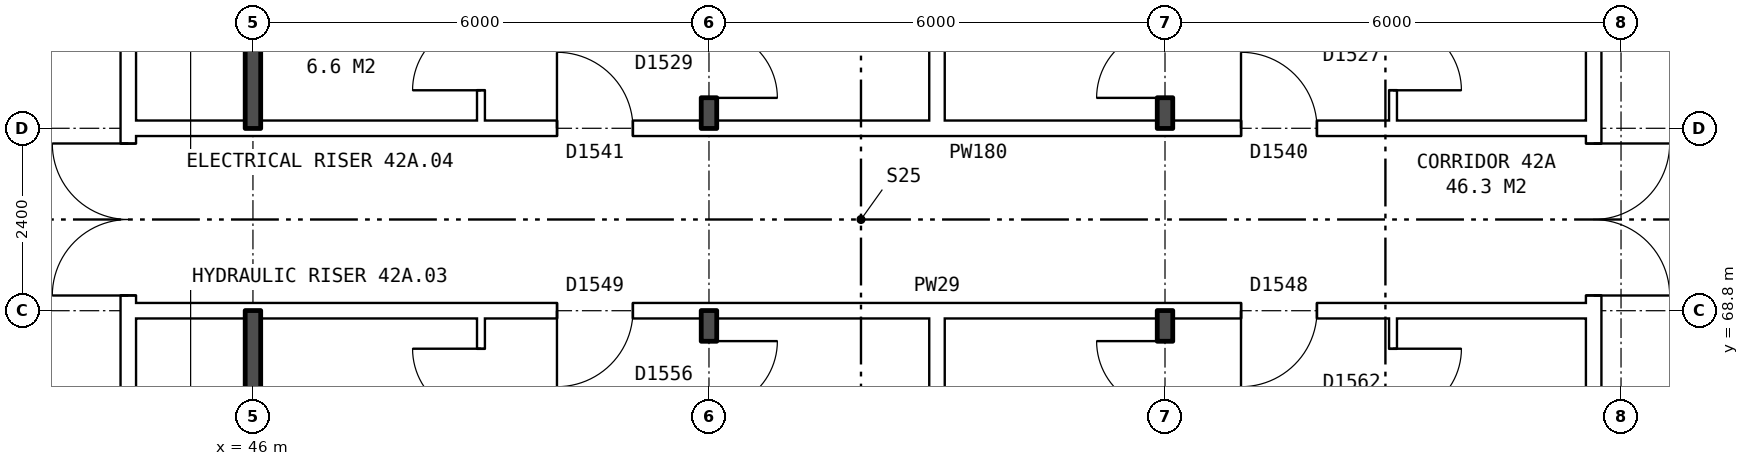
"""IFC4 building model, lengths in metres.
Left out: names, types, materials, properties, quantities, classifications, styles, units other than length and angle.
Written with IfcOpenShell. Run it as: python <this file> out.ifc"""

import sys

from ifc_helpers import new_model, si_unit, direction, frame, frame_2d, origin, place, context, subcontext, project, spatial, rectangle, extrude, element, fill, save


model = new_model("IFC4")
c1 = context("Model", 3, precision=1e-05, world=origin(), true_north=direction((0.0, 1.0)))
c2 = subcontext(c1, "Body", "Model", "MODEL_VIEW")
j1 = project(units=[si_unit("LENGTHUNIT", "METRE"), si_unit("PLANEANGLEUNIT", "RADIAN")], contexts=[c1])
p1 = place(None, origin())
s1 = spatial("IfcSite", under=j1, at=p1, CompositionType="ELEMENT")
p2 = place(p1, origin())
s2 = spatial("IfcBuilding", under=s1, at=p2, CompositionType="ELEMENT")
p3 = place(p2, frame((0.0, 0.0, 151.6)))
s3 = spatial("IfcBuildingStorey", under=s2, at=p3, CompositionType="ELEMENT", Elevation=151.6)
p4 = place(p3, frame((63.64, 63.9, 0.0), z_axis=(0.0, 0.0, 1.0), x_axis=(0.0, 1.0, 0.0)))
e1 = element("IfcWall", 1, at=p4, inside=s3, PredefinedType="PARTITIONING", context=c2, shape_type="SweptSolid", body=[
    extrude(rectangle(XDim=12.2, YDim=0.2, at=frame_2d((6.1, 0.0))), origin(), (0.0, 0.0, 1.0), 2.85),
])
p5 = place(p4, frame((5.1, 0.0, 0.0)))
e2 = element("IfcOpeningElement", 2, at=p5, cuts=e1, PredefinedType="OPENING", context=c2, shape_type="SweptSolid", body=[
    extrude(rectangle(XDim=2.0, YDim=2.1, at=frame_2d((1.0, 1.05))), frame((0.0, 0.11, 0.0), z_axis=(0.0, -1.0, 0.0), x_axis=(1.0, 0.0, 0.0)), (0.0, 0.0, 1.0), 0.22),
])
p6 = place(p3, frame((44.36, 63.9, 0.0), z_axis=(0.0, 0.0, 1.0), x_axis=(0.0, 1.0, 0.0)))
e3 = element("IfcWall", 3, at=p6, inside=s3, PredefinedType="PARTITIONING", context=c2, shape_type="SweptSolid", body=[
    extrude(rectangle(XDim=12.2, YDim=0.2, at=frame_2d((6.1, 0.0))), origin(), (0.0, 0.0, 1.0), 2.85),
])
p7 = place(p6, frame((5.1, 0.0, 0.0)))
e4 = element("IfcOpeningElement", 4, at=p7, cuts=e3, PredefinedType="OPENING", context=c2, shape_type="SweptSolid", body=[
    extrude(rectangle(XDim=2.0, YDim=2.1, at=frame_2d((1.0, 1.05))), frame((0.0, 0.11, 0.0), z_axis=(0.0, -1.0, 0.0), x_axis=(1.0, 0.0, 0.0)), (0.0, 0.0, 1.0), 0.22),
])
p8 = place(p3, frame((44.36, 68.8, 0.0), z_axis=(0.0, 0.0, 1.0), x_axis=(1.0, 0.0, 0.0)))
e5 = element("IfcWall", 5, at=p8, inside=s3, PredefinedType="PARTITIONING", context=c2, shape_type="SweptSolid", body=[
    extrude(rectangle(XDim=19.28, YDim=0.2, at=frame_2d((9.64, 0.0))), origin(), (0.0, 0.0, 1.0), 2.85),
])
p9 = place(p8, frame((14.64, 0.0, 0.0)))
e6 = element("IfcOpeningElement", 6, at=p9, cuts=e5, PredefinedType="OPENING", context=c2, shape_type="SweptSolid", body=[
    extrude(rectangle(XDim=1.0, YDim=2.1, at=frame_2d((0.5, 1.05))), frame((0.0, 0.11, 0.0), z_axis=(0.0, -1.0, 0.0), x_axis=(1.0, 0.0, 0.0)), (0.0, 0.0, 1.0), 0.22),
])
p10 = place(p8, frame((5.64, 0.0, 0.0)))
e7 = element("IfcOpeningElement", 7, at=p10, cuts=e5, PredefinedType="OPENING", context=c2, shape_type="SweptSolid", body=[
    extrude(rectangle(XDim=1.0, YDim=2.1, at=frame_2d((0.5, 1.05))), frame((0.0, 0.11, 0.0), z_axis=(0.0, -1.0, 0.0), x_axis=(1.0, 0.0, 0.0)), (0.0, 0.0, 1.0), 0.22),
])
p11 = place(p3, frame((44.36, 71.2, 0.0), z_axis=(0.0, 0.0, 1.0), x_axis=(1.0, 0.0, 0.0)))
e8 = element("IfcWall", 8, at=p11, inside=s3, PredefinedType="PARTITIONING", context=c2, shape_type="SweptSolid", body=[
    extrude(rectangle(XDim=19.28, YDim=0.2, at=frame_2d((9.64, 0.0))), origin(), (0.0, 0.0, 1.0), 2.85),
])
p12 = place(p11, frame((14.64, 0.0, 0.0)))
e9 = element("IfcOpeningElement", 9, at=p12, cuts=e8, PredefinedType="OPENING", context=c2, shape_type="SweptSolid", body=[
    extrude(rectangle(XDim=1.0, YDim=2.1, at=frame_2d((0.5, 1.05))), frame((0.0, 0.11, 0.0), z_axis=(0.0, -1.0, 0.0), x_axis=(1.0, 0.0, 0.0)), (0.0, 0.0, 1.0), 0.22),
])
p13 = place(p11, frame((5.64, 0.0, 0.0)))
e10 = element("IfcOpeningElement", 10, at=p13, cuts=e8, PredefinedType="OPENING", context=c2, shape_type="SweptSolid", body=[
    extrude(rectangle(XDim=1.0, YDim=2.1, at=frame_2d((0.5, 1.05))), frame((0.0, 0.11, 0.0), z_axis=(0.0, -1.0, 0.0), x_axis=(1.0, 0.0, 0.0)), (0.0, 0.0, 1.0), 0.22),
])
for number, where, z_axis, x_axis in (
    (11, (46.0, 63.8, 0.0), (0.0, 0.0, 1.0), (0.0, 1.0, 0.0)),
    (12, (46.0, 71.2, 0.0), (0.0, 0.0, 1.0), (0.0, 1.0, 0.0)),
):
    element("IfcWall", number, at=place(p3, frame(where, z_axis=z_axis, x_axis=x_axis)), inside=s3, PredefinedType="SOLIDWALL", context=c2, shape_type="SweptSolid", body=[
        extrude(rectangle(XDim=5.0, YDim=0.2, at=frame_2d((2.5, 0.0))), origin(), (0.0, 0.0, 1.0), 2.85),
    ])
p14 = place(p3, frame((49.0, 54.36, 0.0), z_axis=(0.0, 0.0, 1.0), x_axis=(0.0, 1.0, 0.0)))
e13 = element("IfcWall", 13, at=p14, inside=s3, PredefinedType="PARTITIONING", context=c2, shape_type="SweptSolid", body=[
    extrude(rectangle(XDim=14.34, YDim=0.1, at=frame_2d((7.17, 0.0))), origin(), (0.0, 0.0, 1.0), 2.85),
])
p15 = place(p14, frame((7.7, 0.0, 0.0)))
e14 = element("IfcOpeningElement", 14, at=p15, cuts=e13, PredefinedType="OPENING", context=c2, shape_type="SweptSolid", body=[
    extrude(rectangle(XDim=0.9, YDim=2.1, at=frame_2d((0.45, 1.05))), frame((0.0, 0.06, 0.0), z_axis=(0.0, -1.0, 0.0), x_axis=(1.0, 0.0, 0.0)), (0.0, 0.0, 1.0), 0.12),
])
p16 = place(p14, frame((13.04, 0.0, 0.0)))
e15 = element("IfcOpeningElement", 15, at=p16, cuts=e13, PredefinedType="OPENING", context=c2, shape_type="SweptSolid", body=[
    extrude(rectangle(XDim=0.9, YDim=2.1, at=frame_2d((0.45, 1.05))), frame((0.0, 0.06, 0.0), z_axis=(0.0, -1.0, 0.0), x_axis=(1.0, 0.0, 0.0)), (0.0, 0.0, 1.0), 0.12),
])
p17 = place(p3, frame((49.0, 71.3, 0.0), z_axis=(0.0, 0.0, 1.0), x_axis=(0.0, 1.0, 0.0)))
e16 = element("IfcWall", 16, at=p17, inside=s3, PredefinedType="PARTITIONING", context=c2, shape_type="SweptSolid", body=[
    extrude(rectangle(XDim=14.34, YDim=0.1, at=frame_2d((7.17, 0.0))), origin(), (0.0, 0.0, 1.0), 2.85),
])
p18 = place(p17, frame((5.74, 0.0, 0.0)))
e17 = element("IfcOpeningElement", 17, at=p18, cuts=e16, PredefinedType="OPENING", context=c2, shape_type="SweptSolid", body=[
    extrude(rectangle(XDim=0.9, YDim=2.1, at=frame_2d((0.45, 1.05))), frame((0.0, 0.06, 0.0), z_axis=(0.0, -1.0, 0.0), x_axis=(1.0, 0.0, 0.0)), (0.0, 0.0, 1.0), 0.12),
])
p19 = place(p17, frame((0.4, 0.0, 0.0)))
e18 = element("IfcOpeningElement", 18, at=p19, cuts=e16, PredefinedType="OPENING", context=c2, shape_type="SweptSolid", body=[
    extrude(rectangle(XDim=0.9, YDim=2.1, at=frame_2d((0.45, 1.05))), frame((0.0, 0.06, 0.0), z_axis=(0.0, -1.0, 0.0), x_axis=(1.0, 0.0, 0.0)), (0.0, 0.0, 1.0), 0.12),
])
p20 = place(p3, frame((52.0, 54.36, 0.0), z_axis=(0.0, 0.0, 1.0), x_axis=(0.0, 1.0, 0.0)))
e19 = element("IfcWall", 19, at=p20, inside=s3, PredefinedType="SOLIDWALL", context=c2, shape_type="SweptSolid", body=[
    extrude(rectangle(XDim=14.44, YDim=0.2, at=frame_2d((7.22, 0.0))), origin(), (0.0, 0.0, 1.0), 2.85),
])
p21 = place(p20, frame((7.7, 0.0, 0.0)))
e20 = element("IfcOpeningElement", 20, at=p21, cuts=e19, PredefinedType="OPENING", context=c2, shape_type="SweptSolid", body=[
    extrude(rectangle(XDim=0.9, YDim=2.1, at=frame_2d((0.45, 1.05))), frame((0.0, 0.11, 0.0), z_axis=(0.0, -1.0, 0.0), x_axis=(1.0, 0.0, 0.0)), (0.0, 0.0, 1.0), 0.22),
])
p22 = place(p20, frame((13.14, 0.0, 0.0)))
e21 = element("IfcOpeningElement", 21, at=p22, cuts=e19, PredefinedType="OPENING", context=c2, shape_type="SweptSolid", body=[
    extrude(rectangle(XDim=0.9, YDim=2.1, at=frame_2d((0.45, 1.05))), frame((0.0, 0.11, 0.0), z_axis=(0.0, -1.0, 0.0), x_axis=(1.0, 0.0, 0.0)), (0.0, 0.0, 1.0), 0.22),
])
p23 = place(p3, frame((52.0, 71.2, 0.0), z_axis=(0.0, 0.0, 1.0), x_axis=(0.0, 1.0, 0.0)))
e22 = element("IfcWall", 22, at=p23, inside=s3, PredefinedType="SOLIDWALL", context=c2, shape_type="SweptSolid", body=[
    extrude(rectangle(XDim=14.44, YDim=0.2, at=frame_2d((7.22, 0.0))), origin(), (0.0, 0.0, 1.0), 2.85),
])
p24 = place(p23, frame((5.84, 0.0, 0.0)))
e23 = element("IfcOpeningElement", 23, at=p24, cuts=e22, PredefinedType="OPENING", context=c2, shape_type="SweptSolid", body=[
    extrude(rectangle(XDim=0.9, YDim=2.1, at=frame_2d((0.45, 1.05))), frame((0.0, 0.11, 0.0), z_axis=(0.0, -1.0, 0.0), x_axis=(1.0, 0.0, 0.0)), (0.0, 0.0, 1.0), 0.22),
])
p25 = place(p23, frame((0.4, 0.0, 0.0)))
e24 = element("IfcOpeningElement", 24, at=p25, cuts=e22, PredefinedType="OPENING", context=c2, shape_type="SweptSolid", body=[
    extrude(rectangle(XDim=0.9, YDim=2.1, at=frame_2d((0.45, 1.05))), frame((0.0, 0.11, 0.0), z_axis=(0.0, -1.0, 0.0), x_axis=(1.0, 0.0, 0.0)), (0.0, 0.0, 1.0), 0.22),
])
for number, where, z_axis, x_axis in (
    (25, (55.0, 54.36, 0.0), (0.0, 0.0, 1.0), (0.0, 1.0, 0.0)),
    (26, (55.0, 71.3, 0.0), (0.0, 0.0, 1.0), (0.0, 1.0, 0.0)),
):
    element("IfcWall", number, at=place(p3, frame(where, z_axis=z_axis, x_axis=x_axis)), inside=s3, PredefinedType="PARTITIONING", context=c2, shape_type="SweptSolid", body=[
        extrude(rectangle(XDim=14.34, YDim=0.2, at=frame_2d((7.17, 0.0))), origin(), (0.0, 0.0, 1.0), 2.85),
    ])
p26 = place(p3, frame((58.0, 54.36, 0.0), z_axis=(0.0, 0.0, 1.0), x_axis=(0.0, 1.0, 0.0)))
e27 = element("IfcWall", 27, at=p26, inside=s3, PredefinedType="SOLIDWALL", context=c2, shape_type="SweptSolid", body=[
    extrude(rectangle(XDim=14.44, YDim=0.2, at=frame_2d((7.22, 0.0))), origin(), (0.0, 0.0, 1.0), 2.85),
])
p27 = place(p26, frame((7.7, 0.0, 0.0)))
e28 = element("IfcOpeningElement", 28, at=p27, cuts=e27, PredefinedType="OPENING", context=c2, shape_type="SweptSolid", body=[
    extrude(rectangle(XDim=0.9, YDim=2.1, at=frame_2d((0.45, 1.05))), frame((0.0, 0.11, 0.0), z_axis=(0.0, -1.0, 0.0), x_axis=(1.0, 0.0, 0.0)), (0.0, 0.0, 1.0), 0.22),
])
p28 = place(p26, frame((13.14, 0.0, 0.0)))
e29 = element("IfcOpeningElement", 29, at=p28, cuts=e27, PredefinedType="OPENING", context=c2, shape_type="SweptSolid", body=[
    extrude(rectangle(XDim=0.9, YDim=2.1, at=frame_2d((0.45, 1.05))), frame((0.0, 0.11, 0.0), z_axis=(0.0, -1.0, 0.0), x_axis=(1.0, 0.0, 0.0)), (0.0, 0.0, 1.0), 0.22),
])
p29 = place(p3, frame((58.0, 71.2, 0.0), z_axis=(0.0, 0.0, 1.0), x_axis=(0.0, 1.0, 0.0)))
e30 = element("IfcWall", 30, at=p29, inside=s3, PredefinedType="SOLIDWALL", context=c2, shape_type="SweptSolid", body=[
    extrude(rectangle(XDim=14.44, YDim=0.2, at=frame_2d((7.22, 0.0))), origin(), (0.0, 0.0, 1.0), 2.85),
])
p30 = place(p29, frame((5.84, 0.0, 0.0)))
e31 = element("IfcOpeningElement", 31, at=p30, cuts=e30, PredefinedType="OPENING", context=c2, shape_type="SweptSolid", body=[
    extrude(rectangle(XDim=0.9, YDim=2.1, at=frame_2d((0.45, 1.05))), frame((0.0, 0.11, 0.0), z_axis=(0.0, -1.0, 0.0), x_axis=(1.0, 0.0, 0.0)), (0.0, 0.0, 1.0), 0.22),
])
p31 = place(p29, frame((0.4, 0.0, 0.0)))
e32 = element("IfcOpeningElement", 32, at=p31, cuts=e30, PredefinedType="OPENING", context=c2, shape_type="SweptSolid", body=[
    extrude(rectangle(XDim=0.9, YDim=2.1, at=frame_2d((0.45, 1.05))), frame((0.0, 0.11, 0.0), z_axis=(0.0, -1.0, 0.0), x_axis=(1.0, 0.0, 0.0)), (0.0, 0.0, 1.0), 0.22),
])
p32 = place(p3, frame((61.0, 54.36, 0.0), z_axis=(0.0, 0.0, 1.0), x_axis=(0.0, 1.0, 0.0)))
e33 = element("IfcWall", 33, at=p32, inside=s3, PredefinedType="PARTITIONING", context=c2, shape_type="SweptSolid", body=[
    extrude(rectangle(XDim=14.34, YDim=0.1, at=frame_2d((7.17, 0.0))), origin(), (0.0, 0.0, 1.0), 2.85),
])
p33 = place(p32, frame((7.7, 0.0, 0.0)))
e34 = element("IfcOpeningElement", 34, at=p33, cuts=e33, PredefinedType="OPENING", context=c2, shape_type="SweptSolid", body=[
    extrude(rectangle(XDim=0.9, YDim=2.1, at=frame_2d((0.45, 1.05))), frame((0.0, 0.06, 0.0), z_axis=(0.0, -1.0, 0.0), x_axis=(1.0, 0.0, 0.0)), (0.0, 0.0, 1.0), 0.12),
])
p34 = place(p32, frame((13.04, 0.0, 0.0)))
e35 = element("IfcOpeningElement", 35, at=p34, cuts=e33, PredefinedType="OPENING", context=c2, shape_type="SweptSolid", body=[
    extrude(rectangle(XDim=0.9, YDim=2.1, at=frame_2d((0.45, 1.05))), frame((0.0, 0.06, 0.0), z_axis=(0.0, -1.0, 0.0), x_axis=(1.0, 0.0, 0.0)), (0.0, 0.0, 1.0), 0.12),
])
p35 = place(p3, frame((61.0, 71.3, 0.0), z_axis=(0.0, 0.0, 1.0), x_axis=(0.0, 1.0, 0.0)))
e36 = element("IfcWall", 36, at=p35, inside=s3, PredefinedType="PARTITIONING", context=c2, shape_type="SweptSolid", body=[
    extrude(rectangle(XDim=14.34, YDim=0.1, at=frame_2d((7.17, 0.0))), origin(), (0.0, 0.0, 1.0), 2.85),
])
p36 = place(p35, frame((5.74, 0.0, 0.0)))
e37 = element("IfcOpeningElement", 37, at=p36, cuts=e36, PredefinedType="OPENING", context=c2, shape_type="SweptSolid", body=[
    extrude(rectangle(XDim=0.9, YDim=2.1, at=frame_2d((0.45, 1.05))), frame((0.0, 0.06, 0.0), z_axis=(0.0, -1.0, 0.0), x_axis=(1.0, 0.0, 0.0)), (0.0, 0.0, 1.0), 0.12),
])
p37 = place(p35, frame((0.4, 0.0, 0.0)))
e38 = element("IfcOpeningElement", 38, at=p37, cuts=e36, PredefinedType="OPENING", context=c2, shape_type="SweptSolid", body=[
    extrude(rectangle(XDim=0.9, YDim=2.1, at=frame_2d((0.45, 1.05))), frame((0.0, 0.06, 0.0), z_axis=(0.0, -1.0, 0.0), x_axis=(1.0, 0.0, 0.0)), (0.0, 0.0, 1.0), 0.12),
])
p38 = place(p5, frame((2.0, 0.0, 0.0), z_axis=(0.0, 0.0, 1.0), x_axis=(-1.0, 0.0, 0.0)))
e39 = element("IfcDoor", 39, at=p38, inside=s3, OperationType="DOUBLE_DOOR_SINGLE_SWING", PredefinedType="DOOR", context=c2, shape_type="SweptSolid", body=[
    extrude(rectangle(XDim=2.0, YDim=2.1, at=frame_2d((1.0, 1.05))), frame((0.0, 0.025, 0.0), z_axis=(0.0, -1.0, 0.0), x_axis=(1.0, 0.0, 0.0)), (0.0, 0.0, 1.0), 0.05),
])
fill(e2, e39)
p39 = place(p7, origin())
e40 = element("IfcDoor", 40, at=p39, inside=s3, OperationType="DOUBLE_DOOR_SINGLE_SWING", PredefinedType="DOOR", context=c2, shape_type="SweptSolid", body=[
    extrude(rectangle(XDim=2.0, YDim=2.1, at=frame_2d((1.0, 1.05))), frame((0.0, 0.025, 0.0), z_axis=(0.0, -1.0, 0.0), x_axis=(1.0, 0.0, 0.0)), (0.0, 0.0, 1.0), 0.05),
])
fill(e4, e40)
p40 = place(p9, frame((1.0, 0.0, 0.0), z_axis=(0.0, 0.0, 1.0), x_axis=(-1.0, 0.0, 0.0)))
e41 = element("IfcDoor", 41, at=p40, inside=s3, OperationType="SINGLE_SWING_RIGHT", PredefinedType="DOOR", context=c2, shape_type="SweptSolid", body=[
    extrude(rectangle(XDim=1.0, YDim=2.1, at=frame_2d((0.5, 1.05))), frame((0.0, 0.025, 0.0), z_axis=(0.0, -1.0, 0.0), x_axis=(1.0, 0.0, 0.0)), (0.0, 0.0, 1.0), 0.05),
])
fill(e6, e41)
p41 = place(p34, frame((0.9, 0.0, 0.0), z_axis=(0.0, 0.0, 1.0), x_axis=(-1.0, 0.0, 0.0)))
e42 = element("IfcDoor", 42, at=p41, inside=s3, OperationType="SINGLE_SWING_LEFT", PredefinedType="DOOR", context=c2, shape_type="SweptSolid", body=[
    extrude(rectangle(XDim=0.9, YDim=2.1, at=frame_2d((0.45, 1.05))), frame((0.0, 0.025, 0.0), z_axis=(0.0, -1.0, 0.0), x_axis=(1.0, 0.0, 0.0)), (0.0, 0.0, 1.0), 0.05),
])
fill(e35, e42)
p42 = place(p28, origin())
e43 = element("IfcDoor", 43, at=p42, inside=s3, OperationType="SINGLE_SWING_RIGHT", PredefinedType="DOOR", context=c2, shape_type="SweptSolid", body=[
    extrude(rectangle(XDim=0.9, YDim=2.1, at=frame_2d((0.45, 1.05))), frame((0.0, 0.025, 0.0), z_axis=(0.0, -1.0, 0.0), x_axis=(1.0, 0.0, 0.0)), (0.0, 0.0, 1.0), 0.05),
])
fill(e29, e43)
p43 = place(p10, frame((1.0, 0.0, 0.0), z_axis=(0.0, 0.0, 1.0), x_axis=(-1.0, 0.0, 0.0)))
e44 = element("IfcDoor", 44, at=p43, inside=s3, OperationType="SINGLE_SWING_RIGHT", PredefinedType="DOOR", context=c2, shape_type="SweptSolid", body=[
    extrude(rectangle(XDim=1.0, YDim=2.1, at=frame_2d((0.5, 1.05))), frame((0.0, 0.025, 0.0), z_axis=(0.0, -1.0, 0.0), x_axis=(1.0, 0.0, 0.0)), (0.0, 0.0, 1.0), 0.05),
])
fill(e7, e44)
p44 = place(p22, frame((0.9, 0.0, 0.0), z_axis=(0.0, 0.0, 1.0), x_axis=(-1.0, 0.0, 0.0)))
e45 = element("IfcDoor", 45, at=p44, inside=s3, OperationType="SINGLE_SWING_LEFT", PredefinedType="DOOR", context=c2, shape_type="SweptSolid", body=[
    extrude(rectangle(XDim=0.9, YDim=2.1, at=frame_2d((0.45, 1.05))), frame((0.0, 0.025, 0.0), z_axis=(0.0, -1.0, 0.0), x_axis=(1.0, 0.0, 0.0)), (0.0, 0.0, 1.0), 0.05),
])
fill(e21, e45)
p45 = place(p16, origin())
e46 = element("IfcDoor", 46, at=p45, inside=s3, OperationType="SINGLE_SWING_RIGHT", PredefinedType="DOOR", context=c2, shape_type="SweptSolid", body=[
    extrude(rectangle(XDim=0.9, YDim=2.1, at=frame_2d((0.45, 1.05))), frame((0.0, 0.025, 0.0), z_axis=(0.0, -1.0, 0.0), x_axis=(1.0, 0.0, 0.0)), (0.0, 0.0, 1.0), 0.05),
])
fill(e15, e46)
p46 = place(p12, origin())
e47 = element("IfcDoor", 47, at=p46, inside=s3, OperationType="SINGLE_SWING_LEFT", PredefinedType="DOOR", context=c2, shape_type="SweptSolid", body=[
    extrude(rectangle(XDim=1.0, YDim=2.1, at=frame_2d((0.5, 1.05))), frame((0.0, 0.025, 0.0), z_axis=(0.0, -1.0, 0.0), x_axis=(1.0, 0.0, 0.0)), (0.0, 0.0, 1.0), 0.05),
])
fill(e9, e47)
p47 = place(p37, frame((0.9, 0.0, 0.0), z_axis=(0.0, 0.0, 1.0), x_axis=(-1.0, 0.0, 0.0)))
e48 = element("IfcDoor", 48, at=p47, inside=s3, OperationType="SINGLE_SWING_RIGHT", PredefinedType="DOOR", context=c2, shape_type="SweptSolid", body=[
    extrude(rectangle(XDim=0.9, YDim=2.1, at=frame_2d((0.45, 1.05))), frame((0.0, 0.025, 0.0), z_axis=(0.0, -1.0, 0.0), x_axis=(1.0, 0.0, 0.0)), (0.0, 0.0, 1.0), 0.05),
])
fill(e38, e48)
p48 = place(p31, origin())
e49 = element("IfcDoor", 49, at=p48, inside=s3, OperationType="SINGLE_SWING_LEFT", PredefinedType="DOOR", context=c2, shape_type="SweptSolid", body=[
    extrude(rectangle(XDim=0.9, YDim=2.1, at=frame_2d((0.45, 1.05))), frame((0.0, 0.025, 0.0), z_axis=(0.0, -1.0, 0.0), x_axis=(1.0, 0.0, 0.0)), (0.0, 0.0, 1.0), 0.05),
])
fill(e32, e49)
p49 = place(p13, origin())
e50 = element("IfcDoor", 50, at=p49, inside=s3, OperationType="SINGLE_SWING_LEFT", PredefinedType="DOOR", context=c2, shape_type="SweptSolid", body=[
    extrude(rectangle(XDim=1.0, YDim=2.1, at=frame_2d((0.5, 1.05))), frame((0.0, 0.025, 0.0), z_axis=(0.0, -1.0, 0.0), x_axis=(1.0, 0.0, 0.0)), (0.0, 0.0, 1.0), 0.05),
])
fill(e10, e50)
p50 = place(p25, frame((0.9, 0.0, 0.0), z_axis=(0.0, 0.0, 1.0), x_axis=(-1.0, 0.0, 0.0)))
e51 = element("IfcDoor", 51, at=p50, inside=s3, OperationType="SINGLE_SWING_RIGHT", PredefinedType="DOOR", context=c2, shape_type="SweptSolid", body=[
    extrude(rectangle(XDim=0.9, YDim=2.1, at=frame_2d((0.45, 1.05))), frame((0.0, 0.025, 0.0), z_axis=(0.0, -1.0, 0.0), x_axis=(1.0, 0.0, 0.0)), (0.0, 0.0, 1.0), 0.05),
])
fill(e24, e51)
p51 = place(p19, origin())
e52 = element("IfcDoor", 52, at=p51, inside=s3, OperationType="SINGLE_SWING_LEFT", PredefinedType="DOOR", context=c2, shape_type="SweptSolid", body=[
    extrude(rectangle(XDim=0.9, YDim=2.1, at=frame_2d((0.45, 1.05))), frame((0.0, 0.025, 0.0), z_axis=(0.0, -1.0, 0.0), x_axis=(1.0, 0.0, 0.0)), (0.0, 0.0, 1.0), 0.05),
])
fill(e18, e52)
save(model, sys.argv[1])
